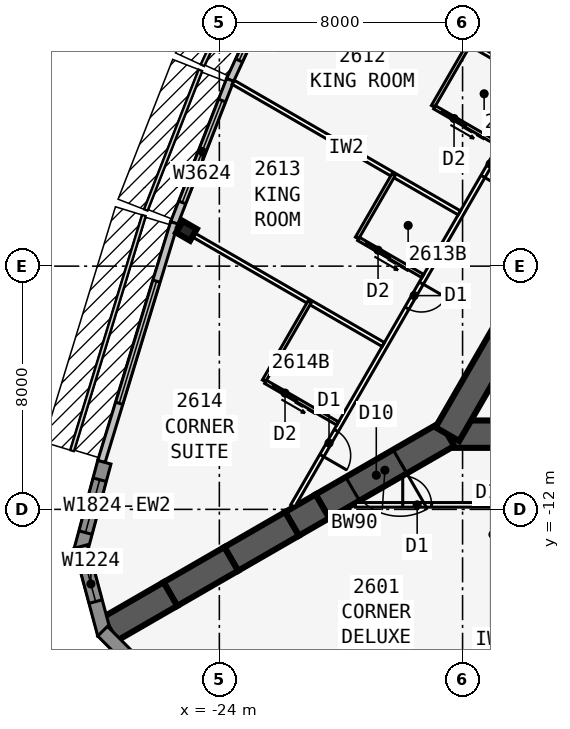
"""IFC4 building model, lengths in metres.
Left out: names, types, materials, properties, quantities, classifications, styles, units other than length and angle.
Written with IfcOpenShell. Run it as: python <this file> out.ifc"""

import sys

from ifc_helpers import new_model, si_unit, direction, frame, frame_2d, origin, origin_2d, place, context, subcontext, project, spatial, polyline, rectangle, i_section, outline, extrude, element, fill, save


model = new_model("IFC4")
c1 = context("Model", 3, precision=1e-05, world=origin(), true_north=direction((0.0, 1.0)))
c2 = subcontext(c1, "Body", "Model", "MODEL_VIEW")
j1 = project(units=[si_unit("LENGTHUNIT", "METRE"), si_unit("PLANEANGLEUNIT", "RADIAN")], contexts=[c1])
p1 = place(None, origin())
s1 = spatial("IfcSite", under=j1, at=p1, CompositionType="ELEMENT")
p2 = place(p1, origin())
s2 = spatial("IfcBuilding", under=s1, at=p2, CompositionType="ELEMENT")
p3 = place(p2, frame((0.0, 0.0, 99.9)))
s3 = spatial("IfcBuildingStorey", under=s2, at=p3, CompositionType="ELEMENT", Elevation=99.9)
p4 = place(p3, frame((-16.5, -9.526, 0.0), z_axis=(0.0, 0.0, 1.0), x_axis=(1.0, 0.0, 0.0)))
e1 = element("IfcWall", 1, at=p4, inside=s3, PredefinedType="SHEAR", context=c2, shape_type="SweptSolid", body=[
    extrude(rectangle(XDim=33.0, YDim=0.9, at=frame_2d((16.5, 0.0))), origin(), (0.0, 0.0, 1.0), 3.4),
])
p5 = place(p4, frame((14.05, 0.0, 0.0)))
e2 = element("IfcOpeningElement", 2, at=p5, cuts=e1, PredefinedType="OPENING", context=c2, shape_type="SweptSolid", body=[
    extrude(rectangle(XDim=1.8, YDim=2.13, at=frame_2d((0.9, 1.065))), frame((0.0, 0.46, 0.0), z_axis=(0.0, -1.0, 0.0), x_axis=(1.0, 0.0, 0.0)), (0.0, 0.0, 1.0), 0.92),
])
p6 = place(p3, frame((0.0, 19.052, 0.0), z_axis=(0.0, 0.0, 1.0), x_axis=(-0.499999749417, -0.866025548458, 0.0)))
e3 = element("IfcWall", 3, at=p6, inside=s3, PredefinedType="SHEAR", context=c2, shape_type="SweptSolid", body=[
    extrude(rectangle(XDim=33.0, YDim=0.9, at=frame_2d((16.5, 0.0))), origin(), (0.0, 0.0, 1.0), 3.4),
])
p7 = place(p6, frame((14.15, 0.0, 0.0)))
e4 = element("IfcOpeningElement", 4, at=p7, cuts=e3, PredefinedType="OPENING", context=c2, shape_type="SweptSolid", body=[
    extrude(rectangle(XDim=1.8, YDim=2.13, at=frame_2d((0.9, 1.065))), frame((0.0, 0.46, 0.0), z_axis=(0.0, -1.0, 0.0), x_axis=(1.0, 0.0, 0.0)), (0.0, 0.0, 1.0), 0.92),
])
p8 = place(p6, frame((12.6, 0.0, 0.0)))
e5 = element("IfcOpeningElement", 5, at=p8, cuts=e3, PredefinedType="OPENING", context=c2, shape_type="SweptSolid", body=[
    extrude(rectangle(XDim=1.0, YDim=2.13, at=frame_2d((0.5, 1.065))), frame((0.0, 0.46, 0.0), z_axis=(0.0, -1.0, 0.0), x_axis=(1.0, 0.0, 0.0)), (0.0, 0.0, 1.0), 0.92),
])
p9 = place(p3, frame((-16.5, -9.526, 0.0), z_axis=(0.0, 0.0, 1.0), x_axis=(-0.866031398331, -0.499989616998, 0.0)))
e6 = element("IfcWall", 6, at=p9, inside=s3, PredefinedType="SHEAR", context=c2, shape_type="SweptSolid", body=[
    extrude(rectangle(XDim=4.746, YDim=0.9, at=frame_2d((2.373, 0.0))), origin(), (0.0, 0.0, 1.0), 3.4),
])
p10 = place(p9, frame((1.8, 0.0, 0.0)))
e7 = element("IfcOpeningElement", 7, at=p10, cuts=e6, PredefinedType="OPENING", context=c2, shape_type="SweptSolid", body=[
    extrude(rectangle(XDim=1.8, YDim=2.13, at=frame_2d((0.9, 1.065))), frame((0.0, 0.46, 0.0), z_axis=(0.0, -1.0, 0.0), x_axis=(1.0, 0.0, 0.0)), (0.0, 0.0, 1.0), 0.92),
])
p11 = place(p3, frame((-20.61, -11.899, 0.0), z_axis=(0.0, 0.0, 1.0), x_axis=(-0.866009537788, -0.500027479704, 0.0)))
e8 = element("IfcWall", 8, at=p11, inside=s3, PredefinedType="SHEAR", context=c2, shape_type="SweptSolid", body=[
    extrude(rectangle(XDim=1.155, YDim=0.9, at=frame_2d((0.577, 0.0))), origin(), (0.0, 0.0, 1.0), 3.4),
])
for number, where, z_axis, x_axis in (
    (9, (-21.61, -12.477, 0.0), (0.0, 0.0, 1.0), (-0.866, -0.5, 0.0)),
    (10, (-23.61, -13.631, 0.0), (0.0, 0.0, 1.0), (-0.866, -0.5, 0.0)),
    (11, (-25.61, -14.786, 0.0), (0.0, 0.0, 1.0), (-0.866, -0.5, 0.0)),
):
    element("IfcWall", number, at=place(p3, frame(where, z_axis=z_axis, x_axis=x_axis)), inside=s3, PredefinedType="SHEAR", context=c2, shape_type="SweptSolid", body=[
        extrude(rectangle(XDim=2.309, YDim=0.9, at=frame_2d((1.155, 0.0))), origin(), (0.0, 0.0, 1.0), 3.4),
    ])
p12 = place(p3, frame((-25.083, -2.839, 0.0), z_axis=(0.0, 0.0, 1.0), x_axis=(-0.5, -0.866025403784, 0.0)))
e12 = element("IfcColumn", 12, at=p12, inside=s3, PredefinedType="COLUMN", context=c2, shape_type="SweptSolid", body=[
    extrude(i_section(OverallWidth=0.442, OverallDepth=0.531, WebThickness=0.066, FlangeThickness=0.106, at=origin_2d()), origin(), (0.0, 0.0, 1.0), 3.4),
])
p13 = place(p3, frame((-21.543, 6.678, 0.0), z_axis=(0.0, 0.0, 1.0), x_axis=(-0.419203100754, -0.907892482796, 0.0)))
e13 = element("IfcWall", 13, at=p13, inside=s3, PredefinedType="STANDARD", context=c2, shape_type="SweptSolid", body=[
    extrude(rectangle(XDim=5.021, YDim=0.25, at=frame_2d((2.51, 0.0))), origin(), (0.0, 0.0, 1.0), 3.15),
])
p14 = place(p13, frame((0.71, 0.0, 0.45)))
e14 = element("IfcOpeningElement", 14, at=p14, cuts=e13, PredefinedType="OPENING", context=c2, shape_type="SweptSolid", body=[
    extrude(rectangle(XDim=3.6, YDim=2.4, at=frame_2d((1.8, 1.2))), frame((0.0, 0.135, 0.0), z_axis=(0.0, -1.0, 0.0), x_axis=(1.0, 0.0, 0.0)), (0.0, 0.0, 1.0), 0.27),
])
p15 = place(p3, frame((-23.645, 2.126, 0.0), z_axis=(0.0, 0.0, 1.0), x_axis=(-0.364013463868, -0.931393685894, 0.0)))
e15 = element("IfcWall", 15, at=p15, inside=s3, PredefinedType="STANDARD", context=c2, shape_type="SweptSolid", body=[
    extrude(rectangle(XDim=5.058, YDim=0.25, at=frame_2d((2.529, 0.0))), origin(), (0.0, 0.0, 1.0), 3.15),
])
p16 = place(p15, frame((0.729, 0.0, 0.45)))
e16 = element("IfcOpeningElement", 16, at=p16, cuts=e15, PredefinedType="OPENING", context=c2, shape_type="SweptSolid", body=[
    extrude(rectangle(XDim=3.6, YDim=2.4, at=frame_2d((1.8, 1.2))), frame((0.0, 0.135, 0.0), z_axis=(0.0, -1.0, 0.0), x_axis=(1.0, 0.0, 0.0)), (0.0, 0.0, 1.0), 0.27),
])
p17 = place(p3, frame((-25.483, -2.575, 0.0), z_axis=(0.0, 0.0, 1.0), x_axis=(-0.2919790669, -0.956424709265, 0.0)))
e17 = element("IfcWall", 17, at=p17, inside=s3, PredefinedType="STANDARD", context=c2, shape_type="SweptSolid", body=[
    extrude(rectangle(XDim=8.211, YDim=0.25, at=frame_2d((4.105, 0.0))), origin(), (0.0, 0.0, 1.0), 3.15),
])
p18 = place(p17, frame((2.006, 0.0, 0.45)))
e18 = element("IfcOpeningElement", 18, at=p18, cuts=e17, PredefinedType="OPENING", context=c2, shape_type="SweptSolid", body=[
    extrude(rectangle(XDim=4.2, YDim=2.4, at=frame_2d((2.1, 1.2))), frame((0.0, 0.135, 0.0), z_axis=(0.0, -1.0, 0.0), x_axis=(1.0, 0.0, 0.0)), (0.0, 0.0, 1.0), 0.27),
])
p19 = place(p3, frame((-27.783, -10.45, 0.0), z_axis=(0.0, 0.0, 1.0), x_axis=(-0.258780998834, -0.965936019953, 0.0)))
e19 = element("IfcWall", 19, at=p19, inside=s3, PredefinedType="SOLIDWALL", context=c2, shape_type="SweptSolid", body=[
    extrude(rectangle(XDim=2.989, YDim=0.45, at=frame_2d((1.494, 0.0))), origin(), (0.0, 0.0, 1.0), 3.15),
])
p20 = place(p19, frame((0.594, 0.0, 0.45)))
e20 = element("IfcOpeningElement", 20, at=p20, cuts=e19, PredefinedType="OPENING", context=c2, shape_type="SweptSolid", body=[
    extrude(rectangle(XDim=1.8, YDim=2.4, at=frame_2d((0.9, 1.2))), frame((0.0, 0.235, 0.0), z_axis=(0.0, -1.0, 0.0), x_axis=(1.0, 0.0, 0.0)), (0.0, 0.0, 1.0), 0.47),
])
p21 = place(p3, frame((-28.556, -13.221, 0.0), z_axis=(0.0, 0.0, 1.0), x_axis=(0.258801419081, -0.965930548995, 0.0)))
e21 = element("IfcWall", 21, at=p21, inside=s3, PredefinedType="SOLIDWALL", context=c2, shape_type="SweptSolid", body=[
    extrude(outline(polyline([(2.989, 0.225), (2.929, 0.225), (2.437, 0.093), (2.402, 0.225), (0.0, 0.225), (0.0, -0.225), (2.989, -0.225), (2.989, 0.225)])), origin(), (0.0, 0.0, 1.0), 3.15),
])
p22 = place(p21, frame((0.676, 0.0, 0.45)))
e22 = element("IfcOpeningElement", 22, at=p22, cuts=e21, PredefinedType="OPENING", context=c2, shape_type="SweptSolid", body=[
    extrude(rectangle(XDim=1.2, YDim=2.4, at=frame_2d((0.6, 1.2))), frame((0.0, 0.235, 0.0), z_axis=(0.0, -1.0, 0.0), x_axis=(1.0, 0.0, 0.0)), (0.0, 0.0, 1.0), 0.47),
])
p23 = place(p3, frame((-27.841, -16.007, 0.0), z_axis=(0.0, 0.0, 1.0), x_axis=(0.707025086683, -0.707188466253, 0.0)))
e23 = element("IfcWall", 23, at=p23, inside=s3, PredefinedType="SOLIDWALL", context=c2, shape_type="SweptSolid", body=[
    extrude(outline(polyline([(2.989, 0.225), (0.586, 0.225), (0.551, 0.093), (0.059, 0.225), (0.0, 0.225), (0.0, -0.225), (2.989, -0.225), (2.989, 0.225)])), origin(), (0.0, 0.0, 1.0), 3.15),
])
p24 = place(p23, frame((1.113, 0.0, 0.45)))
e24 = element("IfcOpeningElement", 24, at=p24, cuts=e23, PredefinedType="OPENING", context=c2, shape_type="SweptSolid", body=[
    extrude(rectangle(XDim=1.2, YDim=2.4, at=frame_2d((0.6, 1.2))), frame((0.0, 0.235, 0.0), z_axis=(0.0, -1.0, 0.0), x_axis=(1.0, 0.0, 0.0)), (0.0, 0.0, 1.0), 0.47),
])
p25 = place(p3, frame((-19.527, -11.851, 0.0), z_axis=(0.0, 0.0, 1.0), x_axis=(1.0, 0.0, 0.0)))
e25 = element("IfcWall", 25, at=p25, inside=s3, PredefinedType="PARTITIONING", context=c2, shape_type="SweptSolid", body=[
    extrude(rectangle(XDim=39.054, YDim=0.15, at=frame_2d((19.527, 0.0))), origin(), (0.0, 0.0, 1.0), 3.15),
])
p26 = place(p25, frame((1.558, 0.0, 0.0)))
e26 = element("IfcOpeningElement", 26, at=p26, cuts=e25, PredefinedType="OPENING", context=c2, shape_type="SweptSolid", body=[
    extrude(rectangle(XDim=0.95, YDim=2.13, at=frame_2d((0.475, 1.065))), frame((0.0, 0.085, 0.0), z_axis=(0.0, -1.0, 0.0), x_axis=(1.0, 0.0, 0.0)), (0.0, 0.0, 1.0), 0.17),
])
p27 = place(p25, frame((11.552, 0.0, 0.0)))
e27 = element("IfcOpeningElement", 27, at=p27, cuts=e25, PredefinedType="OPENING", context=c2, shape_type="SweptSolid", body=[
    extrude(rectangle(XDim=0.95, YDim=2.13, at=frame_2d((0.475, 1.065))), frame((0.0, 0.085, 0.0), z_axis=(0.0, -1.0, 0.0), x_axis=(1.0, 0.0, 0.0)), (0.0, 0.0, 1.0), 0.17),
])
p28 = place(p25, frame((21.527, 0.0, 0.0)))
e28 = element("IfcOpeningElement", 28, at=p28, cuts=e25, PredefinedType="OPENING", context=c2, shape_type="SweptSolid", body=[
    extrude(rectangle(XDim=1.0, YDim=2.13, at=frame_2d((0.5, 1.065))), frame((0.0, 0.085, 0.0), z_axis=(0.0, -1.0, 0.0), x_axis=(1.0, 0.0, 0.0)), (0.0, 0.0, 1.0), 0.17),
])
p29 = place(p25, frame((26.552, 0.0, 0.0)))
e29 = element("IfcOpeningElement", 29, at=p29, cuts=e25, PredefinedType="OPENING", context=c2, shape_type="SweptSolid", body=[
    extrude(rectangle(XDim=0.95, YDim=2.13, at=frame_2d((0.475, 1.065))), frame((0.0, 0.085, 0.0), z_axis=(0.0, -1.0, 0.0), x_axis=(1.0, 0.0, 0.0)), (0.0, 0.0, 1.0), 0.17),
])
p30 = place(p25, frame((37.752, 0.0, 0.0)))
e30 = element("IfcOpeningElement", 30, at=p30, cuts=e25, PredefinedType="OPENING", context=c2, shape_type="SweptSolid", body=[
    extrude(rectangle(XDim=0.95, YDim=2.13, at=frame_2d((0.475, 1.065))), frame((0.0, 0.085, 0.0), z_axis=(0.0, -1.0, 0.0), x_axis=(1.0, 0.0, 0.0)), (0.0, 0.0, 1.0), 0.17),
])
p31 = place(p3, frame((-0.5, 24.636, 0.0), z_axis=(0.0, 0.0, 1.0), x_axis=(-0.500001915564, -0.86602429783, 0.0)))
e31 = element("IfcWall", 31, at=p31, inside=s3, PredefinedType="PARTITIONING", context=c2, shape_type="SweptSolid", body=[
    extrude(rectangle(XDim=42.172, YDim=0.15, at=frame_2d((21.086, 0.0))), origin(), (0.0, 0.0, 1.0), 3.15),
])
p32 = place(p31, frame((1.911, 0.0, 0.0)))
e32 = element("IfcOpeningElement", 32, at=p32, cuts=e31, PredefinedType="OPENING", context=c2, shape_type="SweptSolid", body=[
    extrude(rectangle(XDim=0.95, YDim=2.13, at=frame_2d((0.475, 1.065))), frame((0.0, 0.085, 0.0), z_axis=(0.0, -1.0, 0.0), x_axis=(1.0, 0.0, 0.0)), (0.0, 0.0, 1.0), 0.17),
])
p33 = place(p31, frame((8.111, 0.0, 0.0)))
e33 = element("IfcOpeningElement", 33, at=p33, cuts=e31, PredefinedType="OPENING", context=c2, shape_type="SweptSolid", body=[
    extrude(rectangle(XDim=0.95, YDim=2.13, at=frame_2d((0.475, 1.065))), frame((0.0, 0.085, 0.0), z_axis=(0.0, -1.0, 0.0), x_axis=(1.0, 0.0, 0.0)), (0.0, 0.0, 1.0), 0.17),
])
p34 = place(p31, frame((18.111, 0.0, 0.0)))
e34 = element("IfcOpeningElement", 34, at=p34, cuts=e31, PredefinedType="OPENING", context=c2, shape_type="SweptSolid", body=[
    extrude(rectangle(XDim=0.95, YDim=2.13, at=frame_2d((0.475, 1.065))), frame((0.0, 0.085, 0.0), z_axis=(0.0, -1.0, 0.0), x_axis=(1.0, 0.0, 0.0)), (0.0, 0.0, 1.0), 0.17),
])
p35 = place(p31, frame((28.711, 0.0, 0.0)))
e35 = element("IfcOpeningElement", 35, at=p35, cuts=e31, PredefinedType="OPENING", context=c2, shape_type="SweptSolid", body=[
    extrude(rectangle(XDim=0.95, YDim=2.13, at=frame_2d((0.475, 1.065))), frame((0.0, 0.085, 0.0), z_axis=(0.0, -1.0, 0.0), x_axis=(1.0, 0.0, 0.0)), (0.0, 0.0, 1.0), 0.17),
])
p36 = place(p31, frame((33.711, 0.0, 0.0)))
e36 = element("IfcOpeningElement", 36, at=p36, cuts=e31, PredefinedType="OPENING", context=c2, shape_type="SweptSolid", body=[
    extrude(rectangle(XDim=0.95, YDim=2.13, at=frame_2d((0.475, 1.065))), frame((0.0, 0.085, 0.0), z_axis=(0.0, -1.0, 0.0), x_axis=(1.0, 0.0, 0.0)), (0.0, 0.0, 1.0), 0.17),
])
p37 = place(p31, frame((39.311, 0.0, 0.0)))
e37 = element("IfcOpeningElement", 37, at=p37, cuts=e31, PredefinedType="OPENING", context=c2, shape_type="SweptSolid", body=[
    extrude(rectangle(XDim=0.95, YDim=2.13, at=frame_2d((0.475, 1.065))), frame((0.0, 0.085, 0.0), z_axis=(0.0, -1.0, 0.0), x_axis=(1.0, 0.0, 0.0)), (0.0, 0.0, 1.0), 0.17),
])
p38 = place(p3, frame((-13.608, 2.083, 0.0), z_axis=(0.0, 0.0, 1.0), x_axis=(-0.866028232062, 0.499995101247, 0.0)))
e38 = element("IfcWall", 38, at=p38, inside=s3, PredefinedType="PARTITIONING", context=c2, shape_type="SweptSolid", body=[
    extrude(rectangle(XDim=9.043, YDim=0.15, at=frame_2d((4.521, 0.0))), origin(), (0.0, 0.0, 1.0), 2.05),
])
p39 = place(p3, frame((-16.108, -2.247, 0.0), z_axis=(0.0, 0.0, 1.0), x_axis=(-0.866018881988, 0.500011295912, 0.0)))
e39 = element("IfcWall", 39, at=p39, inside=s3, PredefinedType="PARTITIONING", context=c2, shape_type="SweptSolid", body=[
    extrude(rectangle(XDim=8.585, YDim=0.15, at=frame_2d((4.292, 0.0))), origin(), (0.0, 0.0, 1.0), 2.109),
])
p40 = place(p3, frame((-18.608, -6.577, 0.0), z_axis=(0.0, 0.0, 1.0), x_axis=(-0.866034818847, 0.499983692279, 0.0)))
e40 = element("IfcWall", 40, at=p40, inside=s3, PredefinedType="PARTITIONING", context=c2, shape_type="SweptSolid", body=[
    extrude(rectangle(XDim=7.82, YDim=0.15, at=frame_2d((3.91, 0.0))), origin(), (0.0, 0.0, 1.0), 2.05),
])
p41 = place(p3, frame((-15.773, 3.333, 0.0), z_axis=(0.0, 0.0, 1.0), x_axis=(-0.500001309137, -0.866024647952, 0.0)))
e41 = element("IfcWall", 41, at=p41, inside=s3, PredefinedType="PLUMBINGWALL", context=c2, shape_type="SweptSolid", body=[
    extrude(rectangle(XDim=2.4, YDim=0.12, at=frame_2d((1.2, 0.0))), origin(), (0.0, 0.0, 1.0), 3.15),
])
p42 = place(p3, frame((-14.808, 0.005, 0.0), z_axis=(0.0, 0.0, 1.0), x_axis=(-0.866023955769, 0.500002508028, 0.0)))
e42 = element("IfcWall", 42, at=p42, inside=s3, PredefinedType="PLUMBINGWALL", context=c2, shape_type="SweptSolid", body=[
    extrude(rectangle(XDim=2.44, YDim=0.12, at=frame_2d((1.22, 0.0))), origin(), (0.0, 0.0, 1.0), 3.15),
])
p43 = place(p42, frame((1.25, 0.0, 0.0)))
e43 = element("IfcOpeningElement", 43, at=p43, cuts=e42, PredefinedType="OPENING", context=c2, shape_type="SweptSolid", body=[
    extrude(rectangle(XDim=0.9, YDim=2.13, at=frame_2d((0.45, 1.065))), frame((0.0, 0.07, 0.0), z_axis=(0.0, -1.0, 0.0), x_axis=(1.0, 0.0, 0.0)), (0.0, 0.0, 1.0), 0.14),
])
p44 = place(p3, frame((-18.273, -0.997, 0.0), z_axis=(0.0, 0.0, 1.0), x_axis=(-0.499957262057, -0.866050077142, 0.0)))
e44 = element("IfcWall", 44, at=p44, inside=s3, PredefinedType="PLUMBINGWALL", context=c2, shape_type="SweptSolid", body=[
    extrude(rectangle(XDim=2.4, YDim=0.12, at=frame_2d((1.2, 0.0))), origin(), (0.0, 0.0, 1.0), 3.15),
])
p45 = place(p3, frame((-17.308, -4.326, 0.0), z_axis=(0.0, 0.0, 1.0), x_axis=(-0.866023955769, 0.500002508028, 0.0)))
e45 = element("IfcWall", 45, at=p45, inside=s3, PredefinedType="PLUMBINGWALL", context=c2, shape_type="SweptSolid", body=[
    extrude(rectangle(XDim=2.44, YDim=0.12, at=frame_2d((1.22, 0.0))), origin(), (0.0, 0.0, 1.0), 3.15),
])
p46 = place(p45, frame((1.25, 0.0, 0.0)))
e46 = element("IfcOpeningElement", 46, at=p46, cuts=e45, PredefinedType="OPENING", context=c2, shape_type="SweptSolid", body=[
    extrude(rectangle(XDim=0.9, YDim=2.13, at=frame_2d((0.45, 1.065))), frame((0.0, 0.07, 0.0), z_axis=(0.0, -1.0, 0.0), x_axis=(1.0, 0.0, 0.0)), (0.0, 0.0, 1.0), 0.14),
])
p47 = place(p3, frame((-21.033, -5.177, 0.0), z_axis=(0.0, 0.0, 1.0), x_axis=(-0.499990139034, -0.866031096941, 0.0)))
e47 = element("IfcWall", 47, at=p47, inside=s3, PredefinedType="PLUMBINGWALL", context=c2, shape_type="SweptSolid", body=[
    extrude(rectangle(XDim=3.0, YDim=0.12, at=frame_2d((1.5, 0.0))), origin(), (0.0, 0.0, 1.0), 3.15),
])
p48 = place(p3, frame((-20.108, -9.175, 0.0), z_axis=(0.0, 0.0, 1.0), x_axis=(-0.866035715982, 0.499982138324, 0.0)))
e48 = element("IfcWall", 48, at=p48, inside=s3, PredefinedType="PLUMBINGWALL", context=c2, shape_type="SweptSolid", body=[
    extrude(rectangle(XDim=2.74, YDim=0.12, at=frame_2d((1.37, 0.0))), origin(), (0.0, 0.0, 1.0), 3.15),
])
p49 = place(p48, frame((1.55, 0.0, 0.0)))
e49 = element("IfcOpeningElement", 49, at=p49, cuts=e48, PredefinedType="OPENING", context=c2, shape_type="SweptSolid", body=[
    extrude(rectangle(XDim=0.9, YDim=2.13, at=frame_2d((0.45, 1.065))), frame((0.0, 0.07, 0.0), z_axis=(0.0, -1.0, 0.0), x_axis=(1.0, 0.0, 0.0)), (0.0, 0.0, 1.0), 0.14),
])
p50 = place(p14, origin())
e50 = element("IfcWindow", 50, at=p50, inside=s3, PartitioningType="SINGLE_PANEL", PredefinedType="WINDOW", context=c2, shape_type="SweptSolid", body=[
    extrude(rectangle(XDim=3.6, YDim=2.4, at=frame_2d((1.8, 1.2))), frame((0.0, 0.03, 0.0), z_axis=(0.0, -1.0, 0.0), x_axis=(1.0, 0.0, 0.0)), (0.0, 0.0, 1.0), 0.06),
])
fill(e14, e50)
p51 = place(p16, origin())
e51 = element("IfcWindow", 51, at=p51, inside=s3, PartitioningType="SINGLE_PANEL", PredefinedType="WINDOW", context=c2, shape_type="SweptSolid", body=[
    extrude(rectangle(XDim=3.6, YDim=2.4, at=frame_2d((1.8, 1.2))), frame((0.0, 0.03, 0.0), z_axis=(0.0, -1.0, 0.0), x_axis=(1.0, 0.0, 0.0)), (0.0, 0.0, 1.0), 0.06),
])
fill(e16, e51)
p52 = place(p18, origin())
e52 = element("IfcWindow", 52, at=p52, inside=s3, PartitioningType="SINGLE_PANEL", PredefinedType="WINDOW", context=c2, shape_type="SweptSolid", body=[
    extrude(rectangle(XDim=4.2, YDim=2.4, at=frame_2d((2.1, 1.2))), frame((0.0, 0.03, 0.0), z_axis=(0.0, -1.0, 0.0), x_axis=(1.0, 0.0, 0.0)), (0.0, 0.0, 1.0), 0.06),
])
fill(e18, e52)
p53 = place(p20, origin())
e53 = element("IfcWindow", 53, at=p53, inside=s3, PartitioningType="SINGLE_PANEL", PredefinedType="WINDOW", context=c2, shape_type="SweptSolid", body=[
    extrude(rectangle(XDim=1.8, YDim=2.4, at=frame_2d((0.9, 1.2))), frame((0.0, 0.03, 0.0), z_axis=(0.0, -1.0, 0.0), x_axis=(1.0, 0.0, 0.0)), (0.0, 0.0, 1.0), 0.06),
])
fill(e20, e53)
p54 = place(p22, origin())
e54 = element("IfcWindow", 54, at=p54, inside=s3, PartitioningType="SINGLE_PANEL", PredefinedType="WINDOW", context=c2, shape_type="SweptSolid", body=[
    extrude(rectangle(XDim=1.2, YDim=2.4, at=frame_2d((0.6, 1.2))), frame((0.0, 0.03, 0.0), z_axis=(0.0, -1.0, 0.0), x_axis=(1.0, 0.0, 0.0)), (0.0, 0.0, 1.0), 0.06),
])
fill(e22, e54)
p55 = place(p26, origin())
e55 = element("IfcDoor", 55, at=p55, inside=s3, OperationType="SINGLE_SWING_LEFT", PredefinedType="DOOR", context=c2, shape_type="SweptSolid", body=[
    extrude(rectangle(XDim=0.95, YDim=2.13, at=frame_2d((0.475, 1.065))), frame((0.0, 0.025, 0.0), z_axis=(0.0, -1.0, 0.0), x_axis=(1.0, 0.0, 0.0)), (0.0, 0.0, 1.0), 0.05),
])
fill(e26, e55)
p56 = place(p43, origin())
e56 = element("IfcDoor", 56, at=p56, inside=s3, OperationType="SLIDING_TO_LEFT", PredefinedType="DOOR", context=c2, shape_type="SweptSolid", body=[
    extrude(rectangle(XDim=0.9, YDim=2.13, at=frame_2d((0.45, 1.065))), frame((0.0, 0.025, 0.0), z_axis=(0.0, -1.0, 0.0), x_axis=(1.0, 0.0, 0.0)), (0.0, 0.0, 1.0), 0.05),
])
fill(e43, e56)
p57 = place(p35, origin())
e57 = element("IfcDoor", 57, at=p57, inside=s3, OperationType="SINGLE_SWING_RIGHT", PredefinedType="DOOR", context=c2, shape_type="SweptSolid", body=[
    extrude(rectangle(XDim=0.95, YDim=2.13, at=frame_2d((0.475, 1.065))), frame((0.0, 0.025, 0.0), z_axis=(0.0, -1.0, 0.0), x_axis=(1.0, 0.0, 0.0)), (0.0, 0.0, 1.0), 0.05),
])
fill(e35, e57)
p58 = place(p46, origin())
e58 = element("IfcDoor", 58, at=p58, inside=s3, OperationType="SLIDING_TO_LEFT", PredefinedType="DOOR", context=c2, shape_type="SweptSolid", body=[
    extrude(rectangle(XDim=0.9, YDim=2.13, at=frame_2d((0.45, 1.065))), frame((0.0, 0.025, 0.0), z_axis=(0.0, -1.0, 0.0), x_axis=(1.0, 0.0, 0.0)), (0.0, 0.0, 1.0), 0.05),
])
fill(e46, e58)
p59 = place(p36, origin())
e59 = element("IfcDoor", 59, at=p59, inside=s3, OperationType="SINGLE_SWING_LEFT", PredefinedType="DOOR", context=c2, shape_type="SweptSolid", body=[
    extrude(rectangle(XDim=0.95, YDim=2.13, at=frame_2d((0.475, 1.065))), frame((0.0, 0.025, 0.0), z_axis=(0.0, -1.0, 0.0), x_axis=(1.0, 0.0, 0.0)), (0.0, 0.0, 1.0), 0.05),
])
fill(e36, e59)
p60 = place(p49, origin())
e60 = element("IfcDoor", 60, at=p60, inside=s3, OperationType="SLIDING_TO_LEFT", PredefinedType="DOOR", context=c2, shape_type="SweptSolid", body=[
    extrude(rectangle(XDim=0.9, YDim=2.13, at=frame_2d((0.45, 1.065))), frame((0.0, 0.025, 0.0), z_axis=(0.0, -1.0, 0.0), x_axis=(1.0, 0.0, 0.0)), (0.0, 0.0, 1.0), 0.05),
])
fill(e49, e60)
p61 = place(p37, origin())
e61 = element("IfcDoor", 61, at=p61, inside=s3, OperationType="SINGLE_SWING_RIGHT", PredefinedType="DOOR", context=c2, shape_type="SweptSolid", body=[
    extrude(rectangle(XDim=0.95, YDim=2.13, at=frame_2d((0.475, 1.065))), frame((0.0, 0.025, 0.0), z_axis=(0.0, -1.0, 0.0), x_axis=(1.0, 0.0, 0.0)), (0.0, 0.0, 1.0), 0.05),
])
fill(e37, e61)
p62 = place(p10, origin())
e62 = element("IfcDoor", 62, at=p62, inside=s3, OperationType="DOUBLE_DOOR_DOUBLE_SWING", PredefinedType="DOOR", context=c2, shape_type="SweptSolid", body=[
    extrude(rectangle(XDim=1.8, YDim=2.13, at=frame_2d((0.9, 1.065))), frame((0.0, 0.025, 0.0), z_axis=(0.0, -1.0, 0.0), x_axis=(1.0, 0.0, 0.0)), (0.0, 0.0, 1.0), 0.05),
])
fill(e7, e62)
save(model, sys.argv[1])
